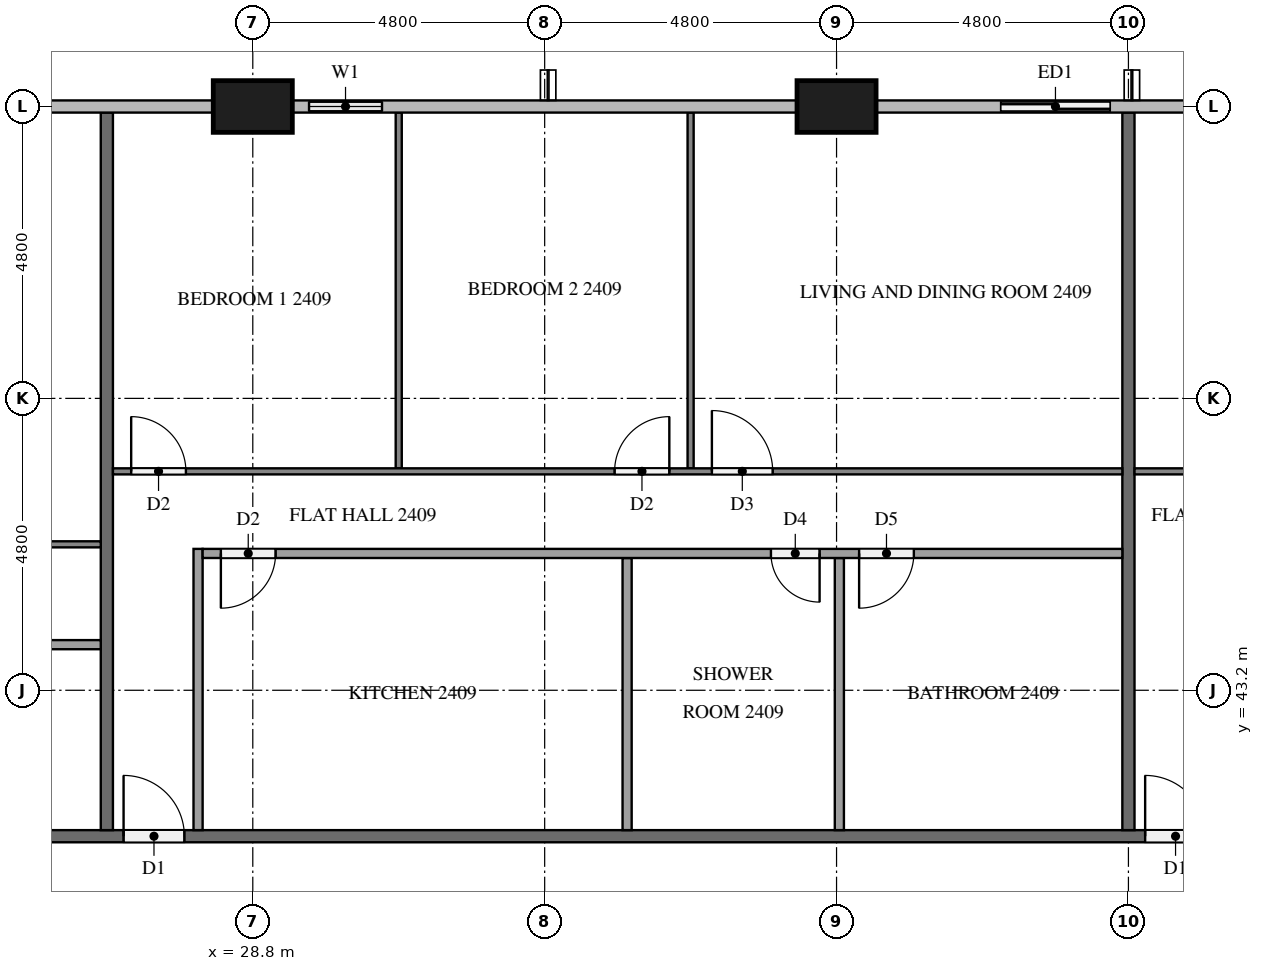
"""IFC4 building model, lengths in metres.
Left out: names, types, materials, properties, quantities, classifications, styles, units other than length and angle.
Written with IfcOpenShell. Run it as: python <this file> out.ifc"""

import sys

from ifc_helpers import new_model, si_unit, direction, frame, frame_2d, origin, origin_2d, place, context, subcontext, project, spatial, rectangle, extrude, element, fill, save


model = new_model("IFC4")
c1 = context("Model", 3, precision=1e-05, world=origin(), true_north=direction((0.0, 1.0)))
c2 = subcontext(c1, "Body", "Model", "MODEL_VIEW")
j1 = project(units=[si_unit("LENGTHUNIT", "METRE"), si_unit("PLANEANGLEUNIT", "RADIAN")], contexts=[c1])
p1 = place(None, origin())
s1 = spatial("IfcSite", under=j1, at=p1, CompositionType="ELEMENT")
p2 = place(p1, origin())
s2 = spatial("IfcBuilding", under=s1, at=p2, CompositionType="ELEMENT")
p3 = place(p2, frame((0.0, 0.0, 96.2)))
s3 = spatial("IfcBuildingStorey", under=s2, at=p3, CompositionType="ELEMENT", Elevation=96.2)
for number, where, z_axis, x_axis in (
    (1, (38.4, 52.8, 0.0), (0.0, 0.0, 1.0), (1.0, 0.0, 0.0)),
    (2, (28.8, 52.8, 0.0), (0.0, 0.0, 1.0), (1.0, 0.0, 0.0)),
):
    element("IfcColumn", number, at=place(p3, frame(where, z_axis=z_axis, x_axis=x_axis)), inside=s3, PredefinedType="COLUMN", context=c2, shape_type="SweptSolid", body=[
        extrude(rectangle(XDim=1.3, YDim=0.85, at=origin_2d()), origin(), (0.0, 0.0, 1.0), 3.2),
    ])
p4 = place(p3, frame((43.2, 52.8, 0.0), z_axis=(0.0, 0.0, 1.0), x_axis=(-1.0, 0.0, 0.0)))
e3 = element("IfcWall", 3, at=p4, inside=s3, PredefinedType="SOLIDWALL", context=c2, shape_type="SweptSolid", body=[
    extrude(rectangle(XDim=2.4, YDim=0.15, at=frame_2d((1.2, 0.0))), origin(), (0.0, 0.0, 1.0), 3.2),
])
p5 = place(p4, frame((0.3, 0.0, 0.0)))
e4 = element("IfcOpeningElement", 4, at=p5, cuts=e3, PredefinedType="OPENING", context=c2, shape_type="SweptSolid", body=[
    extrude(rectangle(XDim=1.8, YDim=2.4, at=frame_2d((0.9, 1.2))), frame((0.0, 0.085, 0.0), z_axis=(0.0, -1.0, 0.0), x_axis=(1.0, 0.0, 0.0)), (0.0, 0.0, 1.0), 0.17),
])
p6 = place(p3, frame((31.2, 52.8, 0.0), z_axis=(0.0, 0.0, 1.0), x_axis=(-1.0, 0.0, 0.0)))
e5 = element("IfcWall", 5, at=p6, inside=s3, PredefinedType="SOLIDWALL", context=c2, shape_type="SweptSolid", body=[
    extrude(rectangle(XDim=1.75, YDim=0.15, at=frame_2d((0.875, 0.0))), origin(), (0.0, 0.0, 1.0), 3.2),
])
p7 = place(p6, frame((0.275, 0.0, 0.9)))
e6 = element("IfcOpeningElement", 6, at=p7, cuts=e5, PredefinedType="OPENING", context=c2, shape_type="SweptSolid", body=[
    extrude(rectangle(XDim=1.2, YDim=1.4, at=frame_2d((0.6, 0.7))), frame((0.0, 0.085, 0.0), z_axis=(0.0, -1.0, 0.0), x_axis=(1.0, 0.0, 0.0)), (0.0, 0.0, 1.0), 0.17),
])
p8 = place(p3, frame((11.9, 40.8, 0.0), z_axis=(0.0, 0.0, 1.0), x_axis=(1.0, 0.0, 0.0)))
e7 = element("IfcWall", 7, at=p8, inside=s3, PredefinedType="PARTITIONING", context=c2, shape_type="SweptSolid", body=[
    extrude(rectangle(XDim=38.6, YDim=0.2, at=frame_2d((19.3, 0.0))), origin(), (0.0, 0.0, 1.0), 3.2),
])
p9 = place(p8, frame((31.575, 0.0, 0.0)))
e8 = element("IfcOpeningElement", 8, at=p9, cuts=e7, PredefinedType="OPENING", context=c2, shape_type="SweptSolid", body=[
    extrude(rectangle(XDim=1.0, YDim=2.1, at=frame_2d((0.5, 1.05))), frame((0.0, 0.11, 0.0), z_axis=(0.0, -1.0, 0.0), x_axis=(1.0, 0.0, 0.0)), (0.0, 0.0, 1.0), 0.22),
])
p10 = place(p8, frame((14.775, 0.0, 0.0)))
e9 = element("IfcOpeningElement", 9, at=p10, cuts=e7, PredefinedType="OPENING", context=c2, shape_type="SweptSolid", body=[
    extrude(rectangle(XDim=1.0, YDim=2.1, at=frame_2d((0.5, 1.05))), frame((0.0, 0.11, 0.0), z_axis=(0.0, -1.0, 0.0), x_axis=(1.0, 0.0, 0.0)), (0.0, 0.0, 1.0), 0.22),
])
p11 = place(p8, frame((0.375, 0.0, 0.0)))
e10 = element("IfcOpeningElement", 10, at=p11, cuts=e7, PredefinedType="OPENING", context=c2, shape_type="SweptSolid", body=[
    extrude(rectangle(XDim=1.0, YDim=2.1, at=frame_2d((0.5, 1.05))), frame((0.0, 0.11, 0.0), z_axis=(0.0, -1.0, 0.0), x_axis=(1.0, 0.0, 0.0)), (0.0, 0.0, 1.0), 0.22),
])
for number, where, z_axis, x_axis in (
    (11, (43.2, 52.7, 0.0), (0.0, 0.0, 1.0), (0.0, -1.0, 0.0)),
    (12, (26.4, 52.7, 0.0), (0.0, 0.0, 1.0), (0.0, -1.0, 0.0)),
):
    element("IfcWall", number, at=place(p3, frame(where, z_axis=z_axis, x_axis=x_axis)), inside=s3, PredefinedType="PARTITIONING", context=c2, shape_type="SweptSolid", body=[
        extrude(rectangle(XDim=11.8, YDim=0.2, at=frame_2d((5.9, 0.0))), origin(), (0.0, 0.0, 1.0), 3.2),
    ])
p12 = place(p3, frame((43.3, 46.8, 0.0), z_axis=(0.0, 0.0, 1.0), x_axis=(1.0, 0.0, 0.0)))
e13 = element("IfcWall", 13, at=p12, inside=s3, PredefinedType="PARTITIONING", context=c2, shape_type="SweptSolid", body=[
    extrude(rectangle(XDim=7.0, YDim=0.1, at=frame_2d((3.5, 0.0))), origin(), (0.0, 0.0, 1.0), 3.2),
])
p13 = place(p12, frame((5.7, 0.0, 0.0)))
e14 = element("IfcOpeningElement", 14, at=p13, cuts=e13, PredefinedType="OPENING", context=c2, shape_type="SweptSolid", body=[
    extrude(rectangle(XDim=1.0, YDim=2.1, at=frame_2d((0.5, 1.05))), frame((0.0, 0.06, 0.0), z_axis=(0.0, -1.0, 0.0), x_axis=(1.0, 0.0, 0.0)), (0.0, 0.0, 1.0), 0.12),
])
for number, where, z_axis, x_axis in (
    (15, (31.2, 46.85, 0.0), (0.0, 0.0, 1.0), (0.0, 1.0, 0.0)),
    (16, (36.0, 46.85, 0.0), (0.0, 0.0, 1.0), (0.0, 1.0, 0.0)),
):
    element("IfcWall", number, at=place(p3, frame(where, z_axis=z_axis, x_axis=x_axis)), inside=s3, PredefinedType="PARTITIONING", context=c2, shape_type="SweptSolid", body=[
        extrude(rectangle(XDim=5.85, YDim=0.1, at=frame_2d((2.925, 0.0))), origin(), (0.0, 0.0, 1.0), 3.2),
    ])
p14 = place(p3, frame((26.5, 46.8, 0.0), z_axis=(0.0, 0.0, 1.0), x_axis=(1.0, 0.0, 0.0)))
e17 = element("IfcWall", 17, at=p14, inside=s3, PredefinedType="PARTITIONING", context=c2, shape_type="SweptSolid", body=[
    extrude(rectangle(XDim=16.6, YDim=0.1, at=frame_2d((8.3, 0.0))), origin(), (0.0, 0.0, 1.0), 3.2),
])
p15 = place(p14, frame((0.3, 0.0, 0.0)))
e18 = element("IfcOpeningElement", 18, at=p15, cuts=e17, PredefinedType="OPENING", context=c2, shape_type="SweptSolid", body=[
    extrude(rectangle(XDim=0.9, YDim=2.1, at=frame_2d((0.45, 1.05))), frame((0.0, 0.06, 0.0), z_axis=(0.0, -1.0, 0.0), x_axis=(1.0, 0.0, 0.0)), (0.0, 0.0, 1.0), 0.12),
])
p16 = place(p14, frame((8.25, 0.0, 0.0)))
e19 = element("IfcOpeningElement", 19, at=p16, cuts=e17, PredefinedType="OPENING", context=c2, shape_type="SweptSolid", body=[
    extrude(rectangle(XDim=0.9, YDim=2.1, at=frame_2d((0.45, 1.05))), frame((0.0, 0.06, 0.0), z_axis=(0.0, -1.0, 0.0), x_axis=(1.0, 0.0, 0.0)), (0.0, 0.0, 1.0), 0.12),
])
p17 = place(p14, frame((9.85, 0.0, 0.0)))
e20 = element("IfcOpeningElement", 20, at=p17, cuts=e17, PredefinedType="OPENING", context=c2, shape_type="SweptSolid", body=[
    extrude(rectangle(XDim=1.0, YDim=2.1, at=frame_2d((0.5, 1.05))), frame((0.0, 0.06, 0.0), z_axis=(0.0, -1.0, 0.0), x_axis=(1.0, 0.0, 0.0)), (0.0, 0.0, 1.0), 0.12),
])
for number, where, z_axis, x_axis in (
    (21, (34.956, 40.9, 0.0), (0.0, 0.0, 1.0), (0.0, 1.0, 0.0)),
    (22, (38.446, 40.9, 0.0), (0.0, 0.0, 1.0), (0.0, 1.0, 0.0)),
):
    element("IfcWall", number, at=place(p3, frame(where, z_axis=z_axis, x_axis=x_axis)), inside=s3, PredefinedType="PARTITIONING", context=c2, shape_type="SweptSolid", body=[
        extrude(rectangle(XDim=4.475, YDim=0.15, at=frame_2d((2.238, 0.0))), origin(), (0.0, 0.0, 1.0), 3.2),
    ])
p18 = place(p3, frame((27.9, 40.9, 0.0), z_axis=(0.0, 0.0, 1.0), x_axis=(0.0, 1.0, 0.0)))
e23 = element("IfcWall", 23, at=p18, inside=s3, PredefinedType="PARTITIONING", context=c2, shape_type="SweptSolid", body=[
    extrude(rectangle(XDim=4.625, YDim=0.15, at=frame_2d((2.312, 0.0))), origin(), (0.0, 0.0, 1.0), 3.2),
])
p19 = place(p3, frame((43.1, 45.45, 0.0), z_axis=(0.0, 0.0, 1.0), x_axis=(-1.0, 0.0, 0.0)))
e24 = element("IfcWall", 24, at=p19, inside=s3, PredefinedType="PARTITIONING", context=c2, shape_type="SweptSolid", body=[
    extrude(rectangle(XDim=15.125, YDim=0.15, at=frame_2d((7.562, 0.0))), origin(), (0.0, 0.0, 1.0), 3.2),
])
p20 = place(p19, frame((13.925, 0.0, 0.0)))
e25 = element("IfcOpeningElement", 25, at=p20, cuts=e24, PredefinedType="OPENING", context=c2, shape_type="SweptSolid", body=[
    extrude(rectangle(XDim=0.9, YDim=2.1, at=frame_2d((0.45, 1.05))), frame((0.0, 0.085, 0.0), z_axis=(0.0, -1.0, 0.0), x_axis=(1.0, 0.0, 0.0)), (0.0, 0.0, 1.0), 0.17),
])
p21 = place(p19, frame((4.979, 0.0, 0.0)))
e26 = element("IfcOpeningElement", 26, at=p21, cuts=e24, PredefinedType="OPENING", context=c2, shape_type="SweptSolid", body=[
    extrude(rectangle(XDim=0.8, YDim=2.1, at=frame_2d((0.4, 1.05))), frame((0.0, 0.085, 0.0), z_axis=(0.0, -1.0, 0.0), x_axis=(1.0, 0.0, 0.0)), (0.0, 0.0, 1.0), 0.17),
])
p22 = place(p19, frame((3.429, 0.0, 0.0)))
e27 = element("IfcOpeningElement", 27, at=p22, cuts=e24, PredefinedType="OPENING", context=c2, shape_type="SweptSolid", body=[
    extrude(rectangle(XDim=0.9, YDim=2.1, at=frame_2d((0.45, 1.05))), frame((0.0, 0.085, 0.0), z_axis=(0.0, -1.0, 0.0), x_axis=(1.0, 0.0, 0.0)), (0.0, 0.0, 1.0), 0.17),
])
p23 = place(p3, frame((12.1, 45.6, 0.0), z_axis=(0.0, 0.0, 1.0), x_axis=(1.0, 0.0, 0.0)))
e28 = element("IfcWall", 28, at=p23, inside=s3, PredefinedType="PARTITIONING", context=c2, shape_type="SweptSolid", body=[
    extrude(rectangle(XDim=14.2, YDim=0.1, at=frame_2d((7.1, 0.0))), origin(), (0.0, 0.0, 1.0), 3.2),
])
p24 = place(p23, frame((0.3, 0.0, 0.0)))
e29 = element("IfcOpeningElement", 29, at=p24, cuts=e28, PredefinedType="OPENING", context=c2, shape_type="SweptSolid", body=[
    extrude(rectangle(XDim=0.9, YDim=2.1, at=frame_2d((0.45, 1.05))), frame((0.0, 0.06, 0.0), z_axis=(0.0, -1.0, 0.0), x_axis=(1.0, 0.0, 0.0)), (0.0, 0.0, 1.0), 0.12),
])
p25 = place(p23, frame((8.15, 0.0, 0.0)))
e30 = element("IfcOpeningElement", 30, at=p25, cuts=e28, PredefinedType="OPENING", context=c2, shape_type="SweptSolid", body=[
    extrude(rectangle(XDim=1.0, YDim=2.1, at=frame_2d((0.5, 1.05))), frame((0.0, 0.06, 0.0), z_axis=(0.0, -1.0, 0.0), x_axis=(1.0, 0.0, 0.0)), (0.0, 0.0, 1.0), 0.12),
])
p26 = place(p23, frame((9.85, 0.0, 0.0)))
e31 = element("IfcOpeningElement", 31, at=p26, cuts=e28, PredefinedType="OPENING", context=c2, shape_type="SweptSolid", body=[
    extrude(rectangle(XDim=0.9, YDim=2.1, at=frame_2d((0.45, 1.05))), frame((0.0, 0.06, 0.0), z_axis=(0.0, -1.0, 0.0), x_axis=(1.0, 0.0, 0.0)), (0.0, 0.0, 1.0), 0.12),
])
p27 = place(p3, frame((26.3, 43.95, 0.0), z_axis=(0.0, 0.0, 1.0), x_axis=(-1.0, 0.0, 0.0)))
e32 = element("IfcWall", 32, at=p27, inside=s3, PredefinedType="PARTITIONING", context=c2, shape_type="SweptSolid", body=[
    extrude(rectangle(XDim=12.725, YDim=0.15, at=frame_2d((6.363, 0.0))), origin(), (0.0, 0.0, 1.0), 3.2),
])
p28 = place(p27, frame((11.625, 0.0, 0.0)))
e33 = element("IfcOpeningElement", 33, at=p28, cuts=e32, PredefinedType="OPENING", context=c2, shape_type="SweptSolid", body=[
    extrude(rectangle(XDim=0.8, YDim=2.1, at=frame_2d((0.4, 1.05))), frame((0.0, 0.085, 0.0), z_axis=(0.0, -1.0, 0.0), x_axis=(1.0, 0.0, 0.0)), (0.0, 0.0, 1.0), 0.17),
])
p29 = place(p27, frame((4.24, 0.0, 0.0)))
e34 = element("IfcOpeningElement", 34, at=p29, cuts=e32, PredefinedType="OPENING", context=c2, shape_type="SweptSolid", body=[
    extrude(rectangle(XDim=0.9, YDim=2.1, at=frame_2d((0.45, 1.05))), frame((0.0, 0.085, 0.0), z_axis=(0.0, -1.0, 0.0), x_axis=(1.0, 0.0, 0.0)), (0.0, 0.0, 1.0), 0.17),
])
p30 = place(p27, frame((2.69, 0.0, 0.0)))
e35 = element("IfcOpeningElement", 35, at=p30, cuts=e32, PredefinedType="OPENING", context=c2, shape_type="SweptSolid", body=[
    extrude(rectangle(XDim=0.9, YDim=2.1, at=frame_2d((0.45, 1.05))), frame((0.0, 0.085, 0.0), z_axis=(0.0, -1.0, 0.0), x_axis=(1.0, 0.0, 0.0)), (0.0, 0.0, 1.0), 0.17),
])
p31 = place(p5, origin())
e36 = element("IfcDoor", 36, at=p31, inside=s3, OperationType="SLIDING_TO_RIGHT", PredefinedType="DOOR", context=c2, shape_type="SweptSolid", body=[
    extrude(rectangle(XDim=1.8, YDim=2.4, at=frame_2d((0.9, 1.2))), frame((0.0, 0.025, 0.0), z_axis=(0.0, -1.0, 0.0), x_axis=(1.0, 0.0, 0.0)), (0.0, 0.0, 1.0), 0.05),
])
fill(e4, e36)
p32 = place(p7, origin())
e37 = element("IfcWindow", 37, at=p32, inside=s3, PartitioningType="SINGLE_PANEL", PredefinedType="WINDOW", context=c2, shape_type="SweptSolid", body=[
    extrude(rectangle(XDim=1.2, YDim=1.4, at=frame_2d((0.6, 0.7))), frame((0.0, 0.03, 0.0), z_axis=(0.0, -1.0, 0.0), x_axis=(1.0, 0.0, 0.0)), (0.0, 0.0, 1.0), 0.06),
])
fill(e6, e37)
p33 = place(p9, origin())
e38 = element("IfcDoor", 38, at=p33, inside=s3, OperationType="SINGLE_SWING_LEFT", PredefinedType="DOOR", context=c2, shape_type="SweptSolid", body=[
    extrude(rectangle(XDim=1.0, YDim=2.1, at=frame_2d((0.5, 1.05))), frame((0.0, 0.025, 0.0), z_axis=(0.0, -1.0, 0.0), x_axis=(1.0, 0.0, 0.0)), (0.0, 0.0, 1.0), 0.05),
])
fill(e8, e38)
p34 = place(p10, origin())
e39 = element("IfcDoor", 39, at=p34, inside=s3, OperationType="SINGLE_SWING_LEFT", PredefinedType="DOOR", context=c2, shape_type="SweptSolid", body=[
    extrude(rectangle(XDim=1.0, YDim=2.1, at=frame_2d((0.5, 1.05))), frame((0.0, 0.025, 0.0), z_axis=(0.0, -1.0, 0.0), x_axis=(1.0, 0.0, 0.0)), (0.0, 0.0, 1.0), 0.05),
])
fill(e9, e39)
p35 = place(p15, origin())
e40 = element("IfcDoor", 40, at=p35, inside=s3, OperationType="SINGLE_SWING_LEFT", PredefinedType="DOOR", context=c2, shape_type="SweptSolid", body=[
    extrude(rectangle(XDim=0.9, YDim=2.1, at=frame_2d((0.45, 1.05))), frame((0.0, 0.025, 0.0), z_axis=(0.0, -1.0, 0.0), x_axis=(1.0, 0.0, 0.0)), (0.0, 0.0, 1.0), 0.05),
])
fill(e18, e40)
p36 = place(p16, origin())
e41 = element("IfcDoor", 41, at=p36, inside=s3, OperationType="SINGLE_SWING_RIGHT", PredefinedType="DOOR", context=c2, shape_type="SweptSolid", body=[
    extrude(rectangle(XDim=0.9, YDim=2.1, at=frame_2d((0.45, 1.05))), frame((0.0, 0.025, 0.0), z_axis=(0.0, -1.0, 0.0), x_axis=(1.0, 0.0, 0.0)), (0.0, 0.0, 1.0), 0.05),
])
fill(e19, e41)
p37 = place(p17, origin())
e42 = element("IfcDoor", 42, at=p37, inside=s3, OperationType="SINGLE_SWING_LEFT", PredefinedType="DOOR", context=c2, shape_type="SweptSolid", body=[
    extrude(rectangle(XDim=1.0, YDim=2.1, at=frame_2d((0.5, 1.05))), frame((0.0, 0.025, 0.0), z_axis=(0.0, -1.0, 0.0), x_axis=(1.0, 0.0, 0.0)), (0.0, 0.0, 1.0), 0.05),
])
fill(e20, e42)
p38 = place(p20, origin())
e43 = element("IfcDoor", 43, at=p38, inside=s3, OperationType="SINGLE_SWING_RIGHT", PredefinedType="DOOR", context=c2, shape_type="SweptSolid", body=[
    extrude(rectangle(XDim=0.9, YDim=2.1, at=frame_2d((0.45, 1.05))), frame((0.0, 0.025, 0.0), z_axis=(0.0, -1.0, 0.0), x_axis=(1.0, 0.0, 0.0)), (0.0, 0.0, 1.0), 0.05),
])
fill(e25, e43)
p39 = place(p21, origin())
e44 = element("IfcDoor", 44, at=p39, inside=s3, OperationType="SINGLE_SWING_LEFT", PredefinedType="DOOR", context=c2, shape_type="SweptSolid", body=[
    extrude(rectangle(XDim=0.8, YDim=2.1, at=frame_2d((0.4, 1.05))), frame((0.0, 0.025, 0.0), z_axis=(0.0, -1.0, 0.0), x_axis=(1.0, 0.0, 0.0)), (0.0, 0.0, 1.0), 0.05),
])
fill(e26, e44)
p40 = place(p22, origin())
e45 = element("IfcDoor", 45, at=p40, inside=s3, OperationType="SINGLE_SWING_RIGHT", PredefinedType="DOOR", context=c2, shape_type="SweptSolid", body=[
    extrude(rectangle(XDim=0.9, YDim=2.1, at=frame_2d((0.45, 1.05))), frame((0.0, 0.025, 0.0), z_axis=(0.0, -1.0, 0.0), x_axis=(1.0, 0.0, 0.0)), (0.0, 0.0, 1.0), 0.05),
])
fill(e27, e45)
save(model, sys.argv[1])
